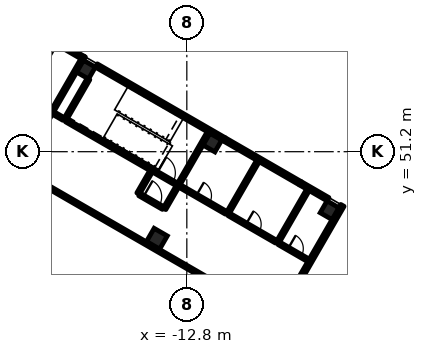
"""IFC4 building model, lengths in metres.
Left out: names, types, materials, properties, quantities, classifications, styles, units other than length and angle.
Written with IfcOpenShell. Run it as: python <this file> out.ifc"""

import sys

from ifc_helpers import new_model, si_unit, direction, frame, frame_2d, origin, origin_2d, place, context, subcontext, project, spatial, rectangle, extrude, element, fill, save


model = new_model("IFC4")
c1 = context("Model", 3, precision=1e-05, world=origin(), true_north=direction((0.0, 1.0)))
c2 = subcontext(c1, "Body", "Model", "MODEL_VIEW")
j1 = project(units=[si_unit("LENGTHUNIT", "METRE"), si_unit("PLANEANGLEUNIT", "RADIAN")], contexts=[c1])
p1 = place(None, origin())
s1 = spatial("IfcSite", under=j1, at=p1, CompositionType="ELEMENT")
p2 = place(p1, origin())
s2 = spatial("IfcBuilding", under=s1, at=p2, CompositionType="ELEMENT")
p3 = place(p2, frame((0.0, 0.0, 11.4)))
s3 = spatial("IfcBuildingStorey", under=s2, at=p3, CompositionType="ELEMENT", Elevation=11.4)
for number, where, z_axis, x_axis in (
    (1, (-3.41, 47.349, 0.0), (0.0, 0.0, 1.0), (-0.5, -0.866, 0.0)),
    (2, (-11.118, 51.799, 0.0), (0.0, 0.0, 1.0), (-0.5, -0.866, 0.0)),
    (3, (-19.432, 56.599, 0.0), (0.0, 0.0, 1.0), (-0.5, -0.866, 0.0)),
):
    element("IfcColumn", number, at=place(p3, frame(where, z_axis=z_axis, x_axis=x_axis)), inside=s3, PredefinedType="COLUMN", context=c2, shape_type="SweptSolid", body=[
        extrude(rectangle(XDim=0.9, YDim=0.9, at=origin_2d()), origin(), (0.0, 0.0, 1.0), 4.8),
    ])
p4 = place(p3, frame((-14.768, 45.477, 0.0), z_axis=(0.0, 0.0, 1.0), x_axis=(-0.5, -0.866025403784, 0.0)))
e4 = element("IfcColumn", 4, at=p4, inside=s3, PredefinedType="COLUMN", context=c2, shape_type="SweptSolid", body=[
    extrude(rectangle(XDim=1.0, YDim=1.0, at=origin_2d()), origin(), (0.0, 0.0, 1.0), 4.8),
])
p5 = place(p3, frame((-2.562, 47.667, 0.0), z_axis=(0.0, 0.0, 1.0), x_axis=(-0.500001855621, -0.866024332438, 0.0)))
e5 = element("IfcWall", 5, at=p5, inside=s3, PredefinedType="SOLIDWALL", context=c2, shape_type="SweptSolid", body=[
    extrude(rectangle(XDim=10.312, YDim=0.25, at=frame_2d((5.156, 0.0))), origin(), (0.0, 0.0, 1.0), 4.5),
])
p6 = place(p3, frame((-5.331, 49.122, 0.0), z_axis=(0.0, 0.0, 1.0), x_axis=(0.866059744384, -0.49994051562, 0.0)))
e6 = element("IfcWall", 6, at=p6, inside=s3, PredefinedType="SOLIDWALL", context=c2, shape_type="SweptSolid", body=[
    extrude(rectangle(XDim=2.1, YDim=0.25, at=frame_2d((1.05, 0.0))), origin(), (0.0, 0.0, 1.0), 4.5),
])
p7 = place(p3, frame((-10.333, 52.009, 0.0), z_axis=(0.0, 0.0, 1.0), x_axis=(0.866018038015, -0.50001275767, 0.0)))
e7 = element("IfcWall", 7, at=p7, inside=s3, PredefinedType="SOLIDWALL", context=c2, shape_type="SweptSolid", body=[
    extrude(rectangle(XDim=5.775, YDim=0.25, at=frame_2d((2.888, 0.0))), origin(), (0.0, 0.0, 1.0), 4.5),
])
p8 = place(p7, frame((3.525, 0.0, 0.9)))
e8 = element("IfcOpeningElement", 8, at=p8, cuts=e7, PredefinedType="OPENING", context=c2, shape_type="SweptSolid", body=[
    extrude(rectangle(XDim=2.0, YDim=1.8, at=frame_2d((1.0, 0.9))), frame((0.0, 0.135, 0.0), z_axis=(0.0, -1.0, 0.0), x_axis=(1.0, 0.0, 0.0)), (0.0, 0.0, 1.0), 0.27),
])
p9 = place(p7, frame((0.25, 0.0, 0.9)))
e9 = element("IfcOpeningElement", 9, at=p9, cuts=e7, PredefinedType="OPENING", context=c2, shape_type="SweptSolid", body=[
    extrude(rectangle(XDim=2.0, YDim=1.8, at=frame_2d((1.0, 0.9))), frame((0.0, 0.135, 0.0), z_axis=(0.0, -1.0, 0.0), x_axis=(1.0, 0.0, 0.0)), (0.0, 0.0, 1.0), 0.27),
])
p10 = place(p3, frame((-18.755, 56.872, 0.0), z_axis=(0.0, 0.0, 1.0), x_axis=(0.866034667978, -0.499983953603, 0.0)))
e10 = element("IfcWall", 10, at=p10, inside=s3, PredefinedType="SOLIDWALL", context=c2, shape_type="SweptSolid", body=[
    extrude(rectangle(XDim=9.725, YDim=0.25, at=frame_2d((4.862, 0.0))), origin(), (0.0, 0.0, 1.0), 4.5),
])
p11 = place(p3, frame((-27.069, 61.672, 0.0), z_axis=(0.0, 0.0, 1.0), x_axis=(0.866021068297, -0.500007509209, 0.0)))
e11 = element("IfcWall", 11, at=p11, inside=s3, PredefinedType="SOLIDWALL", context=c2, shape_type="SweptSolid", body=[
    extrude(rectangle(XDim=8.6, YDim=0.25, at=frame_2d((4.3, 0.0))), origin(), (0.0, 0.0, 1.0), 4.5),
])
p12 = place(p3, frame((-19.621, 57.372, 0.0), z_axis=(0.0, 0.0, 1.0), x_axis=(0.867038199201, -0.4982416694, 0.0)))
e12 = element("IfcWall", 12, at=p12, inside=s3, PredefinedType="SOLIDWALL", context=c2, shape_type="SweptSolid", body=[
    extrude(rectangle(XDim=0.1, YDim=0.25, at=frame_2d((0.05, 0.0))), origin(), (0.0, 0.0, 1.0), 4.5),
])
p13 = place(p3, frame((-11.369, 52.463, 0.0), z_axis=(0.0, 0.0, 1.0), x_axis=(-0.50002537861, -0.866010750942, 0.0)))
e13 = element("IfcWall", 13, at=p13, inside=s3, PredefinedType="SOLIDWALL", context=c2, shape_type="SweptSolid", body=[
    extrude(rectangle(XDim=4.0, YDim=0.2, at=frame_2d((2.0, 0.0))), origin(), (0.0, 0.0, 1.0), 4.5),
])
p14 = place(p3, frame((-19.267, 55.984, 0.0), z_axis=(0.0, 0.0, 1.0), x_axis=(-0.49999285859, -0.86602952684, 0.0)))
e14 = element("IfcWall", 14, at=p14, inside=s3, PredefinedType="SOLIDWALL", context=c2, shape_type="SweptSolid", body=[
    extrude(rectangle(XDim=3.1, YDim=0.2, at=frame_2d((1.55, 0.0))), origin(), (0.0, 0.0, 1.0), 4.5),
])
p15 = place(p3, frame((-19.683, 57.263, 0.0), z_axis=(0.0, 0.0, 1.0), x_axis=(-0.49999894854, -0.866026010844, 0.0)))
e15 = element("IfcWall", 15, at=p15, inside=s3, PredefinedType="SOLIDWALL", context=c2, shape_type="SweptSolid", body=[
    extrude(rectangle(XDim=4.0, YDim=0.2, at=frame_2d((2.0, 0.0))), origin(), (0.0, 0.0, 1.0), 4.5),
])
p16 = place(p3, frame((-14.972, 49.924, 0.0), z_axis=(0.0, 0.0, 1.0), x_axis=(0.866036909293, -0.499980071345, 0.0)))
e16 = element("IfcWall", 16, at=p16, inside=s3, PredefinedType="SOLIDWALL", context=c2, shape_type="SweptSolid", body=[
    extrude(rectangle(XDim=1.75, YDim=0.2, at=frame_2d((0.875, 0.0))), origin(), (0.0, 0.0, 1.0), 4.5),
])
p17 = place(p16, frame((0.25, 0.0, 0.0)))
e17 = element("IfcOpeningElement", 17, at=p17, cuts=e16, PredefinedType="OPENING", context=c2, shape_type="SweptSolid", body=[
    extrude(rectangle(XDim=1.2, YDim=2.1, at=frame_2d((0.6, 1.05))), frame((0.0, 0.11, 0.0), z_axis=(0.0, -1.0, 0.0), x_axis=(1.0, 0.0, 0.0)), (0.0, 0.0, 1.0), 0.22),
])
p18 = place(p3, frame((-14.972, 49.924, 0.0), z_axis=(0.0, 0.0, 1.0), x_axis=(-0.86601134256, 0.500024353964, 0.0)))
e18 = element("IfcWall", 18, at=p18, inside=s3, PredefinedType="SOLIDWALL", context=c2, shape_type="SweptSolid", body=[
    extrude(rectangle(XDim=6.65, YDim=0.2, at=frame_2d((3.325, 0.0))), origin(), (0.0, 0.0, 1.0), 4.5),
])
p19 = place(p3, frame((-13.419, 48.913, 0.0), z_axis=(0.0, 0.0, 1.0), x_axis=(-0.500000056704, -0.866025371046, 0.0)))
e19 = element("IfcWall", 19, at=p19, inside=s3, PredefinedType="PARTITIONING", context=c2, shape_type="SweptSolid", body=[
    extrude(rectangle(XDim=1.7, YDim=0.2, at=frame_2d((0.85, 0.0))), origin(), (0.0, 0.0, 1.0), 3.9),
])
for number, where, z_axis, x_axis in (
    (20, (-15.152, 49.913, 0.0), (0.0, 0.0, 1.0), (-0.5, -0.866, 0.0)),
    (21, (-21.733, 53.713, 0.0), (0.0, 0.0, 1.0), (-0.5, -0.866, 0.0)),
):
    element("IfcWall", number, at=place(p3, frame(where, z_axis=z_axis, x_axis=x_axis)), inside=s3, PredefinedType="PARTITIONING", context=c2, shape_type="SweptSolid", body=[
        extrude(rectangle(XDim=1.7, YDim=0.2, at=frame_2d((0.85, 0.0))), origin(), (0.0, 0.0, 1.0), 3.9),
    ])
p20 = place(p3, frame((-15.915, 48.39, 0.0), z_axis=(0.0, 0.0, 1.0), x_axis=(0.866013897511, -0.50001992892, 0.0)))
e22 = element("IfcWall", 22, at=p20, inside=s3, PredefinedType="PARTITIONING", context=c2, shape_type="SweptSolid", body=[
    extrude(rectangle(XDim=1.8, YDim=0.2, at=frame_2d((0.9, 0.0))), origin(), (0.0, 0.0, 1.0), 3.9),
])
p21 = place(p20, frame((0.3, 0.0, 0.0)))
e23 = element("IfcOpeningElement", 23, at=p21, cuts=e22, PredefinedType="OPENING", context=c2, shape_type="SweptSolid", body=[
    extrude(rectangle(XDim=1.2, YDim=2.1, at=frame_2d((0.6, 1.05))), frame((0.0, 0.11, 0.0), z_axis=(0.0, -1.0, 0.0), x_axis=(1.0, 0.0, 0.0)), (0.0, 0.0, 1.0), 0.22),
])
p22 = place(p3, frame((-4.831, 48.688, 0.0), z_axis=(0.0, 0.0, 1.0), x_axis=(-0.49999894854, -0.866026010844, 0.0)))
e24 = element("IfcWall", 24, at=p22, inside=s3, PredefinedType="PARTITIONING", context=c2, shape_type="SweptSolid", body=[
    extrude(rectangle(XDim=4.0, YDim=0.2, at=frame_2d((2.0, 0.0))), origin(), (0.0, 0.0, 1.0), 3.9),
])
p23 = place(p3, frame((-6.744, 45.174, 0.0), z_axis=(0.0, 0.0, 1.0), x_axis=(0.866017533419, -0.500013631625, 0.0)))
e25 = element("IfcWall", 25, at=p23, inside=s3, PredefinedType="PARTITIONING", context=c2, shape_type="SweptSolid", body=[
    extrude(rectangle(XDim=2.25, YDim=0.2, at=frame_2d((1.125, 0.0))), origin(), (0.0, 0.0, 1.0), 3.9),
])
p24 = place(p23, frame((0.7, 0.0, 0.0)))
e26 = element("IfcOpeningElement", 26, at=p24, cuts=e25, PredefinedType="OPENING", context=c2, shape_type="SweptSolid", body=[
    extrude(rectangle(XDim=1.0, YDim=2.1, at=frame_2d((0.5, 1.05))), frame((0.0, 0.11, 0.0), z_axis=(0.0, -1.0, 0.0), x_axis=(1.0, 0.0, 0.0)), (0.0, 0.0, 1.0), 0.22),
])
p25 = place(p3, frame((-8.122, 50.588, 0.0), z_axis=(0.0, 0.0, 1.0), x_axis=(-0.50002537861, -0.866010750942, 0.0)))
e27 = element("IfcWall", 27, at=p25, inside=s3, PredefinedType="PARTITIONING", context=c2, shape_type="SweptSolid", body=[
    extrude(rectangle(XDim=4.0, YDim=0.2, at=frame_2d((2.0, 0.0))), origin(), (0.0, 0.0, 1.0), 3.9),
])
p26 = place(p3, frame((-10.035, 47.074, 0.0), z_axis=(0.0, 0.0, 1.0), x_axis=(0.866035395735, -0.499982693035, 0.0)))
e28 = element("IfcWall", 28, at=p26, inside=s3, PredefinedType="PARTITIONING", context=c2, shape_type="SweptSolid", body=[
    extrude(rectangle(XDim=3.6, YDim=0.2, at=frame_2d((1.8, 0.0))), origin(), (0.0, 0.0, 1.0), 3.9),
])
p27 = place(p26, frame((1.3, 0.0, 0.0)))
e29 = element("IfcOpeningElement", 29, at=p27, cuts=e28, PredefinedType="OPENING", context=c2, shape_type="SweptSolid", body=[
    extrude(rectangle(XDim=1.0, YDim=2.1, at=frame_2d((0.5, 1.05))), frame((0.0, 0.11, 0.0), z_axis=(0.0, -1.0, 0.0), x_axis=(1.0, 0.0, 0.0)), (0.0, 0.0, 1.0), 0.22),
])
p28 = place(p3, frame((-13.283, 48.949, 0.0), z_axis=(0.0, 0.0, 1.0), x_axis=(0.866012656725, -0.500022077904, 0.0)))
e30 = element("IfcWall", 30, at=p28, inside=s3, PredefinedType="PARTITIONING", context=c2, shape_type="SweptSolid", body=[
    extrude(rectangle(XDim=3.55, YDim=0.2, at=frame_2d((1.775, 0.0))), origin(), (0.0, 0.0, 1.0), 3.9),
])
p29 = place(p28, frame((1.275, 0.0, 0.0)))
e31 = element("IfcOpeningElement", 31, at=p29, cuts=e30, PredefinedType="OPENING", context=c2, shape_type="SweptSolid", body=[
    extrude(rectangle(XDim=1.0, YDim=2.1, at=frame_2d((0.5, 1.05))), frame((0.0, 0.11, 0.0), z_axis=(0.0, -1.0, 0.0), x_axis=(1.0, 0.0, 0.0)), (0.0, 0.0, 1.0), 0.22),
])
p30 = place(p3, frame((-20.904, 53.349, 0.0), z_axis=(0.0, 0.0, 1.0), x_axis=(-0.865961984968, 0.500109828528, 0.0)))
e32 = element("IfcWall", 32, at=p30, inside=s3, PredefinedType="PARTITIONING", context=c2, shape_type="SweptSolid", body=[
    extrude(rectangle(XDim=0.8, YDim=0.2, at=frame_2d((0.4, 0.0))), origin(), (0.0, 0.0, 1.0), 3.9),
])
p31 = place(p3, frame((-10.491, 42.285, 0.0), z_axis=(0.0, 0.0, 1.0), x_axis=(-0.866022857395, 0.50000441045, 0.0)))
e33 = element("IfcWall", 33, at=p31, inside=s3, PredefinedType="PARTITIONING", context=c2, shape_type="SweptSolid", body=[
    extrude(rectangle(XDim=39.4, YDim=0.2, at=frame_2d((19.7, 0.0))), origin(), (0.0, 0.0, 1.0), 3.9),
])
p32 = place(p8, origin())
e34 = element("IfcWindow", 34, at=p32, inside=s3, PartitioningType="SINGLE_PANEL", PredefinedType="WINDOW", context=c2, shape_type="SweptSolid", body=[
    extrude(rectangle(XDim=2.0, YDim=1.8, at=frame_2d((1.0, 0.9))), frame((0.0, 0.03, 0.0), z_axis=(0.0, -1.0, 0.0), x_axis=(1.0, 0.0, 0.0)), (0.0, 0.0, 1.0), 0.06),
])
fill(e8, e34)
p33 = place(p9, origin())
e35 = element("IfcWindow", 35, at=p33, inside=s3, PartitioningType="SINGLE_PANEL", PredefinedType="WINDOW", context=c2, shape_type="SweptSolid", body=[
    extrude(rectangle(XDim=2.0, YDim=1.8, at=frame_2d((1.0, 0.9))), frame((0.0, 0.03, 0.0), z_axis=(0.0, -1.0, 0.0), x_axis=(1.0, 0.0, 0.0)), (0.0, 0.0, 1.0), 0.06),
])
fill(e9, e35)
p34 = place(p17, origin())
e36 = element("IfcDoor", 36, at=p34, inside=s3, OperationType="SINGLE_SWING_LEFT", PredefinedType="DOOR", context=c2, shape_type="SweptSolid", body=[
    extrude(rectangle(XDim=1.2, YDim=2.1, at=frame_2d((0.6, 1.05))), frame((0.0, 0.025, 0.0), z_axis=(0.0, -1.0, 0.0), x_axis=(1.0, 0.0, 0.0)), (0.0, 0.0, 1.0), 0.05),
])
fill(e17, e36)
p35 = place(p21, origin())
e37 = element("IfcDoor", 37, at=p35, inside=s3, OperationType="SINGLE_SWING_LEFT", PredefinedType="DOOR", context=c2, shape_type="SweptSolid", body=[
    extrude(rectangle(XDim=1.2, YDim=2.1, at=frame_2d((0.6, 1.05))), frame((0.0, 0.025, 0.0), z_axis=(0.0, -1.0, 0.0), x_axis=(1.0, 0.0, 0.0)), (0.0, 0.0, 1.0), 0.05),
])
fill(e23, e37)
p36 = place(p24, origin())
e38 = element("IfcDoor", 38, at=p36, inside=s3, OperationType="SINGLE_SWING_LEFT", PredefinedType="DOOR", context=c2, shape_type="SweptSolid", body=[
    extrude(rectangle(XDim=1.0, YDim=2.1, at=frame_2d((0.5, 1.05))), frame((0.0, 0.025, 0.0), z_axis=(0.0, -1.0, 0.0), x_axis=(1.0, 0.0, 0.0)), (0.0, 0.0, 1.0), 0.05),
])
fill(e26, e38)
p37 = place(p27, origin())
e39 = element("IfcDoor", 39, at=p37, inside=s3, OperationType="SINGLE_SWING_LEFT", PredefinedType="DOOR", context=c2, shape_type="SweptSolid", body=[
    extrude(rectangle(XDim=1.0, YDim=2.1, at=frame_2d((0.5, 1.05))), frame((0.0, 0.025, 0.0), z_axis=(0.0, -1.0, 0.0), x_axis=(1.0, 0.0, 0.0)), (0.0, 0.0, 1.0), 0.05),
])
fill(e29, e39)
p38 = place(p29, origin())
e40 = element("IfcDoor", 40, at=p38, inside=s3, OperationType="SINGLE_SWING_LEFT", PredefinedType="DOOR", context=c2, shape_type="SweptSolid", body=[
    extrude(rectangle(XDim=1.0, YDim=2.1, at=frame_2d((0.5, 1.05))), frame((0.0, 0.025, 0.0), z_axis=(0.0, -1.0, 0.0), x_axis=(1.0, 0.0, 0.0)), (0.0, 0.0, 1.0), 0.05),
])
fill(e31, e40)
save(model, sys.argv[1])
